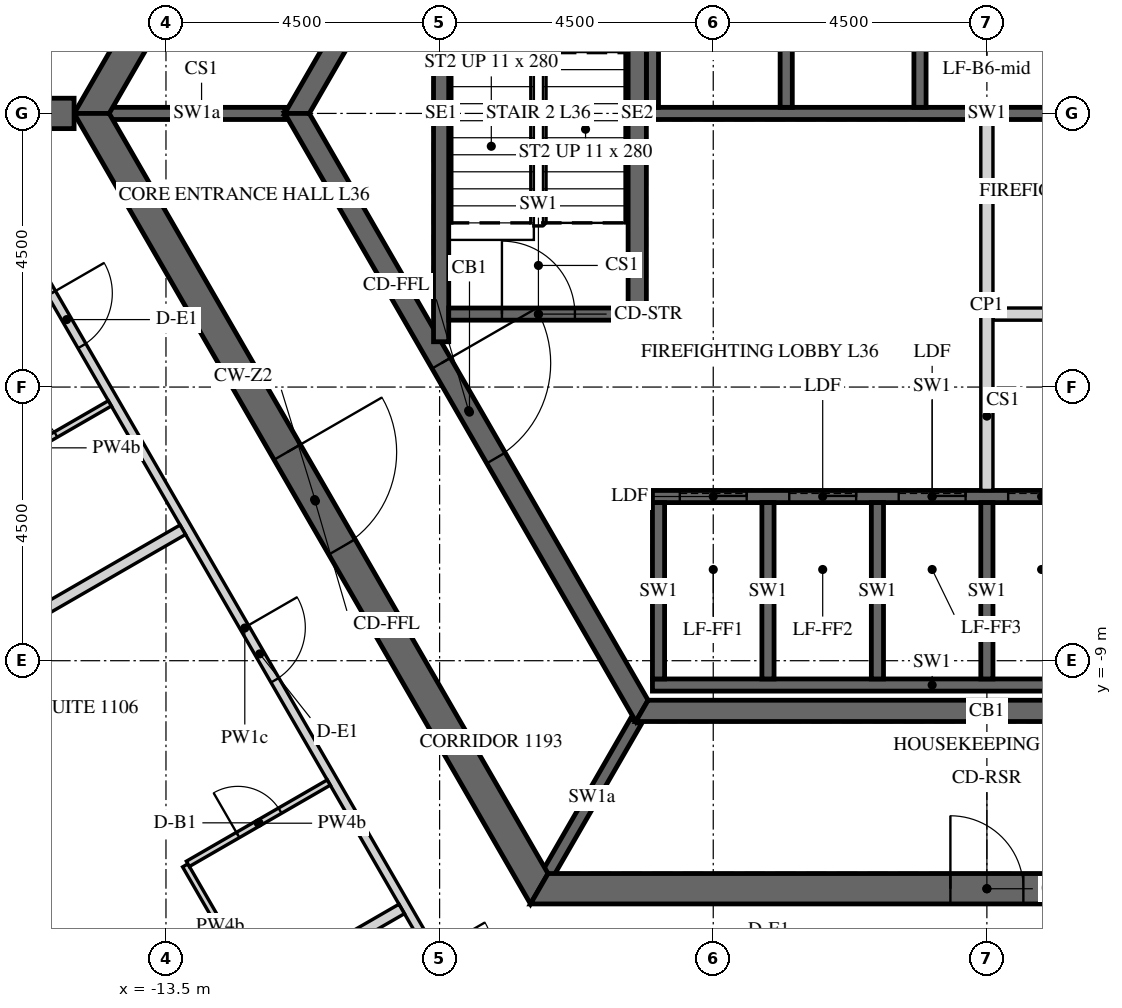
"""IFC4 building model, lengths in metres.
Left out: names, types, materials, properties, quantities, classifications, styles, units other than length and angle.
Written with IfcOpenShell. Run it as: python <this file> out.ifc"""

import sys

from ifc_helpers import new_model, si_unit, direction, frame, frame_2d, origin, place, context, subcontext, project, spatial, polyline, rectangle, outline, extrude, element, fill, save


model = new_model("IFC4")
c1 = context("Model", 3, precision=1e-05, world=origin(), true_north=direction((0.0, 1.0)))
c2 = subcontext(c1, "Body", "Model", "MODEL_VIEW")
j1 = project(units=[si_unit("LENGTHUNIT", "METRE"), si_unit("PLANEANGLEUNIT", "RADIAN")], contexts=[c1])
p1 = place(None, origin())
s1 = spatial("IfcSite", under=j1, at=p1, CompositionType="ELEMENT")
p2 = place(p1, origin())
s2 = spatial("IfcBuilding", under=s1, at=p2, CompositionType="ELEMENT")
p3 = place(p2, frame((0.0, 0.0, 156.6)))
s3 = spatial("IfcBuildingStorey", under=s2, at=p3, CompositionType="ELEMENT", Elevation=156.6)
p4 = place(p3, frame((-7.361, 12.75, -0.15), z_axis=(0.0, 0.0, 1.0), x_axis=(-0.50000571537, -0.866022103989, 0.0)))
e1 = element("IfcWall", 1, at=p4, inside=s3, PredefinedType="SHEAR", context=c2, shape_type="SweptSolid", body=[
    extrude(outline(polyline([(-0.144, -0.25), (14.867, -0.25), (14.578, 0.25), (0.144, 0.25), (-0.144, -0.25)])), origin(), (0.0, 0.0, 1.0), 3.9),
])
p5 = place(p4, frame((6.49, 0.0, 0.15)))
e2 = element("IfcOpeningElement", 2, at=p5, cuts=e1, PredefinedType="OPENING", context=c2, shape_type="SweptSolid", body=[
    extrude(rectangle(XDim=1.8, YDim=2.4, at=frame_2d((0.9, 1.2))), frame((0.0, 0.26, 0.0), z_axis=(0.0, -1.0, 0.0), x_axis=(1.0, 0.0, 0.0)), (0.0, 0.0, 1.0), 0.52),
])
p6 = place(p3, frame((-14.722, 0.0, -0.15), z_axis=(0.0, 0.0, 1.0), x_axis=(0.50000571537, -0.866022103989, 0.0)))
e3 = element("IfcWall", 3, at=p6, inside=s3, PredefinedType="SHEAR", context=c2, shape_type="SweptSolid", body=[
    extrude(outline(polyline([(-0.144, -0.25), (14.867, -0.25), (14.578, 0.25), (0.144, 0.25), (-0.144, -0.25)])), origin(), (0.0, 0.0, 1.0), 3.9),
])
p7 = place(p6, frame((6.432, 0.0, 0.15)))
e4 = element("IfcOpeningElement", 4, at=p7, cuts=e3, PredefinedType="OPENING", context=c2, shape_type="SweptSolid", body=[
    extrude(rectangle(XDim=1.8, YDim=2.4, at=frame_2d((0.9, 1.2))), frame((0.0, 0.26, 0.0), z_axis=(0.0, -1.0, 0.0), x_axis=(1.0, 0.0, 0.0)), (0.0, 0.0, 1.0), 0.52),
])
p8 = place(p3, frame((-7.361, -12.75, -0.15), z_axis=(0.0, 0.0, 1.0), x_axis=(1.0, 0.0, 0.0)))
e5 = element("IfcWall", 5, at=p8, inside=s3, PredefinedType="SHEAR", context=c2, shape_type="SweptSolid", body=[
    extrude(outline(polyline([(-0.144, -0.25), (14.866, -0.25), (14.578, 0.25), (0.144, 0.25), (-0.144, -0.25)])), origin(), (0.0, 0.0, 1.0), 3.9),
])
p9 = place(p8, frame((6.761, 0.0, 0.15)))
e6 = element("IfcOpeningElement", 6, at=p9, cuts=e5, PredefinedType="OPENING", context=c2, shape_type="SweptSolid", body=[
    extrude(rectangle(XDim=1.2, YDim=2.4, at=frame_2d((0.6, 1.2))), frame((0.0, 0.26, 0.0), z_axis=(0.0, -1.0, 0.0), x_axis=(1.0, 0.0, 0.0)), (0.0, 0.0, 1.0), 0.52),
])
p10 = place(p3, frame((-15.011, 0.0, -0.15), z_axis=(0.0, 0.0, 1.0), x_axis=(-1.0, 0.0, 0.0)))
e7 = element("IfcWall", 7, at=p10, inside=s3, PredefinedType="SHEAR", context=c2, shape_type="SweptSolid", body=[
    extrude(rectangle(XDim=15.424, YDim=0.5, at=frame_2d((7.712, 0.0))), origin(), (0.0, 0.0, 1.0), 3.9),
])
p11 = place(p10, frame((6.812, 0.0, 0.15)))
e8 = element("IfcOpeningElement", 8, at=p11, cuts=e7, PredefinedType="OPENING", context=c2, shape_type="SweptSolid", body=[
    extrude(rectangle(XDim=1.8, YDim=2.4, at=frame_2d((0.9, 1.2))), frame((0.0, 0.26, 0.0), z_axis=(0.0, -1.0, 0.0), x_axis=(1.0, 0.0, 0.0)), (0.0, 0.0, 1.0), 0.52),
])
p12 = place(p3, frame((-5.673, 9.825, -0.15), z_axis=(0.0, 0.0, 1.0), x_axis=(-0.499995046907, -0.866028263435, 0.0)))
e9 = element("IfcWall", 9, at=p12, inside=s3, PredefinedType="SHEAR", context=c2, shape_type="SweptSolid", body=[
    extrude(outline(polyline([(-0.101, -0.175), (11.446, -0.175), (11.244, 0.175), (0.101, 0.175), (-0.101, -0.175)])), origin(), (0.0, 0.0, 1.0), 3.9),
])
p13 = place(p12, frame((4.801, 0.0, 0.15)))
e10 = element("IfcOpeningElement", 10, at=p13, cuts=e9, PredefinedType="OPENING", context=c2, shape_type="SweptSolid", body=[
    extrude(rectangle(XDim=1.8, YDim=2.4, at=frame_2d((0.9, 1.2))), frame((0.0, 0.185, 0.0), z_axis=(0.0, -1.0, 0.0), x_axis=(1.0, 0.0, 0.0)), (0.0, 0.0, 1.0), 0.37),
])
p14 = place(p3, frame((-11.345, 0.0, -0.15), z_axis=(0.0, 0.0, 1.0), x_axis=(0.499995046907, -0.866028263435, 0.0)))
e11 = element("IfcWall", 11, at=p14, inside=s3, PredefinedType="SHEAR", context=c2, shape_type="SweptSolid", body=[
    extrude(outline(polyline([(-0.101, -0.175), (11.446, -0.175), (11.244, 0.175), (0.101, 0.175), (-0.101, -0.175)])), origin(), (0.0, 0.0, 1.0), 3.9),
])
p15 = place(p14, frame((4.744, 0.0, 0.15)))
e12 = element("IfcOpeningElement", 12, at=p15, cuts=e11, PredefinedType="OPENING", context=c2, shape_type="SweptSolid", body=[
    extrude(rectangle(XDim=1.8, YDim=2.4, at=frame_2d((0.9, 1.2))), frame((0.0, 0.185, 0.0), z_axis=(0.0, -1.0, 0.0), x_axis=(1.0, 0.0, 0.0)), (0.0, 0.0, 1.0), 0.37),
])
p16 = place(p3, frame((-5.673, -9.825, -0.15), z_axis=(0.0, 0.0, 1.0), x_axis=(1.0, 0.0, 0.0)))
e13 = element("IfcWall", 13, at=p16, inside=s3, PredefinedType="SHEAR", context=c2, shape_type="SweptSolid", body=[
    extrude(outline(polyline([(-0.101, -0.175), (11.446, -0.175), (11.244, 0.175), (0.101, 0.175), (-0.101, -0.175)])), origin(), (0.0, 0.0, 1.0), 3.9),
])
p17 = place(p3, frame((-5.6, 0.0, -0.25), z_axis=(0.0, 0.0, 1.0), x_axis=(1.0, 0.0, 0.0)))
e14 = element("IfcWall", 14, at=p17, inside=s3, PredefinedType="SHEAR", context=c2, shape_type="SweptSolid", body=[
    extrude(rectangle(XDim=11.2, YDim=0.2, at=frame_2d((5.6, 0.0))), origin(), (0.0, 0.0, 1.0), 3.9),
])
for number, where, z_axis, x_axis in (
    (15, (-5.5, 0.1, -0.25), (0.0, 0.0, 1.0), (0.0, 1.0, 0.0)),
    (16, (-3.3, 0.1, -0.25), (0.0, 0.0, 1.0), (0.0, 1.0, 0.0)),
    (17, (-1.1, 0.1, -0.25), (0.0, 0.0, 1.0), (0.0, 1.0, 0.0)),
):
    element("IfcWall", number, at=place(p3, frame(where, z_axis=z_axis, x_axis=x_axis)), inside=s3, PredefinedType="SHEAR", context=c2, shape_type="SweptSolid", body=[
        extrude(rectangle(XDim=3.1, YDim=0.2, at=frame_2d((1.55, 0.0))), origin(), (0.0, 0.0, 1.0), 3.9),
    ])
p18 = place(p3, frame((-5.5, -6.3, -0.25), z_axis=(0.0, 0.0, 1.0), x_axis=(1.0, 0.0, 0.0)))
e18 = element("IfcWall", 18, at=p18, inside=s3, PredefinedType="SHEAR", context=c2, shape_type="SweptSolid", body=[
    extrude(rectangle(XDim=9.2, YDim=0.2, at=frame_2d((4.6, 0.0))), origin(), (0.0, 0.0, 1.0), 3.9),
])
p19 = place(p18, frame((0.45, 0.0, 0.25)))
e19 = element("IfcOpeningElement", 19, at=p19, cuts=e18, PredefinedType="OPENING", context=c2, shape_type="SweptSolid", body=[
    extrude(rectangle(XDim=1.1, YDim=2.1, at=frame_2d((0.55, 1.05))), frame((0.0, 0.11, 0.0), z_axis=(0.0, -1.0, 0.0), x_axis=(1.0, 0.0, 0.0)), (0.0, 0.0, 1.0), 0.22),
])
p20 = place(p18, frame((2.25, 0.0, 0.25)))
e20 = element("IfcOpeningElement", 20, at=p20, cuts=e18, PredefinedType="OPENING", context=c2, shape_type="SweptSolid", body=[
    extrude(rectangle(XDim=1.1, YDim=2.1, at=frame_2d((0.55, 1.05))), frame((0.0, 0.11, 0.0), z_axis=(0.0, -1.0, 0.0), x_axis=(1.0, 0.0, 0.0)), (0.0, 0.0, 1.0), 0.22),
])
p21 = place(p18, frame((4.05, 0.0, 0.25)))
e21 = element("IfcOpeningElement", 21, at=p21, cuts=e18, PredefinedType="OPENING", context=c2, shape_type="SweptSolid", body=[
    extrude(rectangle(XDim=1.1, YDim=2.1, at=frame_2d((0.55, 1.05))), frame((0.0, 0.11, 0.0), z_axis=(0.0, -1.0, 0.0), x_axis=(1.0, 0.0, 0.0)), (0.0, 0.0, 1.0), 0.22),
])
p22 = place(p18, frame((5.85, 0.0, 0.25)))
e22 = element("IfcOpeningElement", 22, at=p22, cuts=e18, PredefinedType="OPENING", context=c2, shape_type="SweptSolid", body=[
    extrude(rectangle(XDim=1.1, YDim=2.1, at=frame_2d((0.55, 1.05))), frame((0.0, 0.11, 0.0), z_axis=(0.0, -1.0, 0.0), x_axis=(1.0, 0.0, 0.0)), (0.0, 0.0, 1.0), 0.22),
])
p23 = place(p18, frame((7.65, 0.0, 0.25)))
e23 = element("IfcOpeningElement", 23, at=p23, cuts=e18, PredefinedType="OPENING", context=c2, shape_type="SweptSolid", body=[
    extrude(rectangle(XDim=1.1, YDim=2.1, at=frame_2d((0.55, 1.05))), frame((0.0, 0.11, 0.0), z_axis=(0.0, -1.0, 0.0), x_axis=(1.0, 0.0, 0.0)), (0.0, 0.0, 1.0), 0.22),
])
p24 = place(p3, frame((-5.5, -9.4, -0.25), z_axis=(0.0, 0.0, 1.0), x_axis=(1.0, 0.0, 0.0)))
e24 = element("IfcWall", 24, at=p24, inside=s3, PredefinedType="SHEAR", context=c2, shape_type="SweptSolid", body=[
    extrude(rectangle(XDim=9.2, YDim=0.2, at=frame_2d((4.6, 0.0))), origin(), (0.0, 0.0, 1.0), 3.9),
])
for number, where, z_axis, x_axis in (
    (25, (-5.4, -9.3, -0.25), (0.0, 0.0, 1.0), (0.0, 1.0, 0.0)),
    (26, (-3.6, -9.3, -0.25), (0.0, 0.0, 1.0), (0.0, 1.0, 0.0)),
    (27, (-1.8, -9.3, -0.25), (0.0, 0.0, 1.0), (0.0, 1.0, 0.0)),
    (28, (0.0, -9.3, -0.25), (0.0, 0.0, 1.0), (0.0, 1.0, 0.0)),
):
    element("IfcWall", number, at=place(p3, frame(where, z_axis=z_axis, x_axis=x_axis)), inside=s3, PredefinedType="SHEAR", context=c2, shape_type="SweptSolid", body=[
        extrude(rectangle(XDim=2.9, YDim=0.2, at=frame_2d((1.45, 0.0))), origin(), (0.0, 0.0, 1.0), 3.9),
    ])
p25 = place(p3, frame((0.1, -3.3, 0.0), z_axis=(0.0, 0.0, 1.0), x_axis=(1.0, 0.0, 0.0)))
e29 = element("IfcWall", 29, at=p25, inside=s3, PredefinedType="PARTITIONING", context=c2, shape_type="SweptSolid", body=[
    extrude(rectangle(XDim=5.5, YDim=0.2, at=frame_2d((2.75, 0.0))), origin(), (0.0, 0.0, 1.0), 3.65),
])
p26 = place(p25, frame((2.3, 0.0, 0.0)))
e30 = element("IfcOpeningElement", 30, at=p26, cuts=e29, PredefinedType="OPENING", context=c2, shape_type="SweptSolid", body=[
    extrude(rectangle(XDim=0.9, YDim=2.1, at=frame_2d((0.45, 1.05))), frame((0.0, 0.11, 0.0), z_axis=(0.0, -1.0, 0.0), x_axis=(1.0, 0.0, 0.0)), (0.0, 0.0, 1.0), 0.22),
])
p27 = place(p3, frame((0.0, -6.2, 0.0), z_axis=(0.0, 0.0, 1.0), x_axis=(0.0, 1.0, 0.0)))
e31 = element("IfcWall", 31, at=p27, inside=s3, PredefinedType="PARTITIONING", context=c2, shape_type="SweptSolid", body=[
    extrude(rectangle(XDim=6.1, YDim=0.2, at=frame_2d((3.05, 0.0))), origin(), (0.0, 0.0, 1.0), 3.65),
])
for number, where, z_axis, x_axis in (
    (32, (-11.547, 0.0, -0.15), (0.0, 0.0, 1.0), (-1.0, 0.0, 0.0)),
    (33, (-5.773, -10.0, -0.15), (0.0, 0.0, 1.0), (-0.5, -0.866, 0.0)),
):
    element("IfcWall", number, at=place(p3, frame(where, z_axis=z_axis, x_axis=x_axis)), inside=s3, PredefinedType="SHEAR", context=c2, shape_type="SweptSolid", body=[
        extrude(rectangle(XDim=2.887, YDim=0.2, at=frame_2d((1.443, 0.0))), origin(), (0.0, 0.0, 1.0), 3.9),
    ])
p28 = place(p3, frame((-5.75, -3.4, -0.25), z_axis=(0.0, 0.0, 1.0), x_axis=(0.0, 1.0, 0.0)))
e34 = element("IfcWall", 34, at=p28, inside=s3, PredefinedType="SHEAR", context=c2, shape_type="SweptSolid", body=[
    extrude(rectangle(XDim=6.8, YDim=0.3, at=frame_2d((3.4, 0.0))), origin(), (0.0, 0.0, 1.0), 3.9),
])
p29 = place(p3, frame((-8.975, -3.755, -0.25), z_axis=(0.0, 0.0, 1.0), x_axis=(0.0, 1.0, 0.0)))
e35 = element("IfcWall", 35, at=p29, inside=s3, PredefinedType="SHEAR", context=c2, shape_type="SweptSolid", body=[
    extrude(rectangle(XDim=7.51, YDim=0.25, at=frame_2d((3.755, 0.0))), origin(), (0.0, 0.0, 1.0), 3.9),
])
p30 = place(p3, frame((-8.85, -3.3, -0.25), z_axis=(0.0, 0.0, 1.0), x_axis=(1.0, 0.0, 0.0)))
e36 = element("IfcWall", 36, at=p30, inside=s3, PredefinedType="SHEAR", context=c2, shape_type="SweptSolid", body=[
    extrude(rectangle(XDim=2.95, YDim=0.2, at=frame_2d((1.475, 0.0))), origin(), (0.0, 0.0, 1.0), 3.9),
])
p31 = place(p30, frame((0.875, 0.0, 0.25)))
e37 = element("IfcOpeningElement", 37, at=p31, cuts=e36, PredefinedType="OPENING", context=c2, shape_type="SweptSolid", body=[
    extrude(rectangle(XDim=1.2, YDim=2.4, at=frame_2d((0.6, 1.2))), frame((0.0, 0.11, 0.0), z_axis=(0.0, -1.0, 0.0), x_axis=(1.0, 0.0, 0.0)), (0.0, 0.0, 1.0), 0.22),
])
p32 = place(p3, frame((-15.863, -2.125, 0.0), z_axis=(0.0, 0.0, 1.0), x_axis=(0.500008833422, -0.866020303746, 0.0)))
e38 = element("IfcWall", 38, at=p32, inside=s3, PredefinedType="PARTITIONING", context=c2, shape_type="SweptSolid", body=[
    extrude(rectangle(XDim=14.636, YDim=0.15, at=frame_2d((7.318, 0.0))), origin(), (0.0, 0.0, 1.0), 2.823),
])
p33 = place(p32, frame((0.961, 0.0, 0.0)))
e39 = element("IfcOpeningElement", 39, at=p33, cuts=e38, PredefinedType="OPENING", context=c2, shape_type="SweptSolid", body=[
    extrude(rectangle(XDim=1.0, YDim=2.1, at=frame_2d((0.5, 1.05))), frame((0.0, 0.085, 0.0), z_axis=(0.0, -1.0, 0.0), x_axis=(1.0, 0.0, 0.0)), (0.0, 0.0, 1.0), 0.17),
])
p34 = place(p32, frame((7.309, 0.0, 0.0)))
e40 = element("IfcOpeningElement", 40, at=p34, cuts=e38, PredefinedType="OPENING", context=c2, shape_type="SweptSolid", body=[
    extrude(rectangle(XDim=1.0, YDim=2.1, at=frame_2d((0.5, 1.05))), frame((0.0, 0.085, 0.0), z_axis=(0.0, -1.0, 0.0), x_axis=(1.0, 0.0, 0.0)), (0.0, 0.0, 1.0), 0.17),
])
p35 = place(p32, frame((13.486, 0.0, 0.0)))
e41 = element("IfcOpeningElement", 41, at=p35, cuts=e38, PredefinedType="OPENING", context=c2, shape_type="SweptSolid", body=[
    extrude(rectangle(XDim=1.0, YDim=2.1, at=frame_2d((0.5, 1.05))), frame((0.0, 0.085, 0.0), z_axis=(0.0, -1.0, 0.0), x_axis=(1.0, 0.0, 0.0)), (0.0, 0.0, 1.0), 0.17),
])
p36 = place(p3, frame((-16.956, -6.231, 0.0), z_axis=(0.0, 0.0, 1.0), x_axis=(0.866046596414, 0.499963291492, 0.0)))
e42 = element("IfcWall", 42, at=p36, inside=s3, PredefinedType="PARTITIONING", context=c2, shape_type="SweptSolid", body=[
    extrude(rectangle(XDim=2.925, YDim=0.1, at=frame_2d((1.462, 0.0))), origin(), (0.0, 0.0, 1.0), 2.823),
])
p37 = place(p36, frame((1.1, 0.0, 0.0)))
e43 = element("IfcOpeningElement", 43, at=p37, cuts=e42, PredefinedType="OPENING", context=c2, shape_type="SweptSolid", body=[
    extrude(rectangle(XDim=0.8, YDim=2.1, at=frame_2d((0.4, 1.05))), frame((0.0, 0.06, 0.0), z_axis=(0.0, -1.0, 0.0), x_axis=(1.0, 0.0, 0.0)), (0.0, 0.0, 1.0), 0.12),
])
p38 = place(p3, frame((-24.114, -13.134, 0.0), z_axis=(0.0, 0.0, 1.0), x_axis=(0.866024255907, 0.500001988177, 0.0)))
e44 = element("IfcWall", 44, at=p38, inside=s3, PredefinedType="PARTITIONING", context=c2, shape_type="SweptSolid", body=[
    extrude(rectangle(XDim=12.575, YDim=0.18, at=frame_2d((6.288, 0.0))), origin(), (0.0, 0.0, 1.0), 2.823),
])
p39 = place(p3, frame((-12.028, -14.367, 0.0), z_axis=(0.0, 0.0, 1.0), x_axis=(-0.500015210774, 0.866016621662, 0.0)))
e45 = element("IfcWall", 45, at=p39, inside=s3, PredefinedType="PARTITIONING", context=c2, shape_type="SweptSolid", body=[
    extrude(rectangle(XDim=2.31, YDim=0.1, at=frame_2d((1.155, 0.0))), origin(), (0.0, 0.0, 1.0), 2.823),
])
p40 = place(p3, frame((-13.14, -12.341, 0.0), z_axis=(0.0, 0.0, 1.0), x_axis=(0.86604424267, 0.499967368674, 0.0)))
e46 = element("IfcWall", 46, at=p40, inside=s3, PredefinedType="PARTITIONING", context=c2, shape_type="SweptSolid", body=[
    extrude(rectangle(XDim=2.675, YDim=0.1, at=frame_2d((1.337, 0.0))), origin(), (0.0, 0.0, 1.0), 2.823),
])
p41 = place(p40, frame((0.95, 0.0, 0.0)))
e47 = element("IfcOpeningElement", 47, at=p41, cuts=e46, PredefinedType="OPENING", context=c2, shape_type="SweptSolid", body=[
    extrude(rectangle(XDim=0.8, YDim=2.1, at=frame_2d((0.4, 1.05))), frame((0.0, 0.06, 0.0), z_axis=(0.0, -1.0, 0.0), x_axis=(1.0, 0.0, 0.0)), (0.0, 0.0, 1.0), 0.12),
])
p42 = place(p3, frame((-20.513, -19.37, 0.0), z_axis=(0.0, 0.0, 1.0), x_axis=(0.866019402111, 0.500010395058, 0.0)))
e48 = element("IfcWall", 48, at=p42, inside=s3, PredefinedType="PARTITIONING", context=c2, shape_type="SweptSolid", body=[
    extrude(rectangle(XDim=12.575, YDim=0.18, at=frame_2d((6.288, 0.0))), origin(), (0.0, 0.0, 1.0), 2.823),
])
p43 = place(p7, origin())
e49 = element("IfcDoor", 49, at=p43, inside=s3, OperationType="DOUBLE_DOOR_SINGLE_SWING", PredefinedType="DOOR", context=c2, shape_type="SweptSolid", body=[
    extrude(rectangle(XDim=1.8, YDim=2.4, at=frame_2d((0.9, 1.2))), frame((0.0, 0.025, 0.0), z_axis=(0.0, -1.0, 0.0), x_axis=(1.0, 0.0, 0.0)), (0.0, 0.0, 1.0), 0.05),
])
fill(e4, e49)
p44 = place(p9, origin())
e50 = element("IfcDoor", 50, at=p44, inside=s3, OperationType="SINGLE_SWING_LEFT", PredefinedType="DOOR", context=c2, shape_type="SweptSolid", body=[
    extrude(rectangle(XDim=1.2, YDim=2.4, at=frame_2d((0.6, 1.2))), frame((0.0, 0.025, 0.0), z_axis=(0.0, -1.0, 0.0), x_axis=(1.0, 0.0, 0.0)), (0.0, 0.0, 1.0), 0.05),
])
fill(e6, e50)
p45 = place(p15, origin())
e51 = element("IfcDoor", 51, at=p45, inside=s3, OperationType="DOUBLE_DOOR_SINGLE_SWING", PredefinedType="DOOR", context=c2, shape_type="SweptSolid", body=[
    extrude(rectangle(XDim=1.8, YDim=2.4, at=frame_2d((0.9, 1.2))), frame((0.0, 0.025, 0.0), z_axis=(0.0, -1.0, 0.0), x_axis=(1.0, 0.0, 0.0)), (0.0, 0.0, 1.0), 0.05),
])
fill(e12, e51)
p46 = place(p31, origin())
e52 = element("IfcDoor", 52, at=p46, inside=s3, OperationType="SINGLE_SWING_LEFT", PredefinedType="DOOR", context=c2, shape_type="SweptSolid", body=[
    extrude(rectangle(XDim=1.2, YDim=2.4, at=frame_2d((0.6, 1.2))), frame((0.0, 0.025, 0.0), z_axis=(0.0, -1.0, 0.0), x_axis=(1.0, 0.0, 0.0)), (0.0, 0.0, 1.0), 0.05),
])
fill(e37, e52)
p47 = place(p19, origin())
e53 = element("IfcDoor", 53, at=p47, inside=s3, OperationType="SLIDING_TO_LEFT", PredefinedType="DOOR", context=c2, shape_type="SweptSolid", body=[
    extrude(rectangle(XDim=1.1, YDim=2.1, at=frame_2d((0.55, 1.05))), frame((0.0, 0.025, 0.0), z_axis=(0.0, -1.0, 0.0), x_axis=(1.0, 0.0, 0.0)), (0.0, 0.0, 1.0), 0.05),
])
fill(e19, e53)
p48 = place(p20, origin())
e54 = element("IfcDoor", 54, at=p48, inside=s3, OperationType="SLIDING_TO_LEFT", PredefinedType="DOOR", context=c2, shape_type="SweptSolid", body=[
    extrude(rectangle(XDim=1.1, YDim=2.1, at=frame_2d((0.55, 1.05))), frame((0.0, 0.025, 0.0), z_axis=(0.0, -1.0, 0.0), x_axis=(1.0, 0.0, 0.0)), (0.0, 0.0, 1.0), 0.05),
])
fill(e20, e54)
p49 = place(p21, origin())
e55 = element("IfcDoor", 55, at=p49, inside=s3, OperationType="SLIDING_TO_LEFT", PredefinedType="DOOR", context=c2, shape_type="SweptSolid", body=[
    extrude(rectangle(XDim=1.1, YDim=2.1, at=frame_2d((0.55, 1.05))), frame((0.0, 0.025, 0.0), z_axis=(0.0, -1.0, 0.0), x_axis=(1.0, 0.0, 0.0)), (0.0, 0.0, 1.0), 0.05),
])
fill(e21, e55)
p50 = place(p22, origin())
e56 = element("IfcDoor", 56, at=p50, inside=s3, OperationType="SLIDING_TO_LEFT", PredefinedType="DOOR", context=c2, shape_type="SweptSolid", body=[
    extrude(rectangle(XDim=1.1, YDim=2.1, at=frame_2d((0.55, 1.05))), frame((0.0, 0.025, 0.0), z_axis=(0.0, -1.0, 0.0), x_axis=(1.0, 0.0, 0.0)), (0.0, 0.0, 1.0), 0.05),
])
fill(e22, e56)
p51 = place(p33, origin())
e57 = element("IfcDoor", 57, at=p51, inside=s3, OperationType="SINGLE_SWING_RIGHT", PredefinedType="DOOR", context=c2, shape_type="SweptSolid", body=[
    extrude(rectangle(XDim=1.0, YDim=2.1, at=frame_2d((0.5, 1.05))), frame((0.0, 0.025, 0.0), z_axis=(0.0, -1.0, 0.0), x_axis=(1.0, 0.0, 0.0)), (0.0, 0.0, 1.0), 0.05),
])
fill(e39, e57)
p52 = place(p37, origin())
e58 = element("IfcDoor", 58, at=p52, inside=s3, OperationType="SINGLE_SWING_LEFT", PredefinedType="DOOR", context=c2, shape_type="SweptSolid", body=[
    extrude(rectangle(XDim=0.8, YDim=2.1, at=frame_2d((0.4, 1.05))), frame((0.0, 0.025, 0.0), z_axis=(0.0, -1.0, 0.0), x_axis=(1.0, 0.0, 0.0)), (0.0, 0.0, 1.0), 0.05),
])
fill(e43, e58)
p53 = place(p34, origin())
e59 = element("IfcDoor", 59, at=p53, inside=s3, OperationType="SINGLE_SWING_LEFT", PredefinedType="DOOR", context=c2, shape_type="SweptSolid", body=[
    extrude(rectangle(XDim=1.0, YDim=2.1, at=frame_2d((0.5, 1.05))), frame((0.0, 0.025, 0.0), z_axis=(0.0, -1.0, 0.0), x_axis=(1.0, 0.0, 0.0)), (0.0, 0.0, 1.0), 0.05),
])
fill(e40, e59)
p54 = place(p41, origin())
e60 = element("IfcDoor", 60, at=p54, inside=s3, OperationType="SINGLE_SWING_RIGHT", PredefinedType="DOOR", context=c2, shape_type="SweptSolid", body=[
    extrude(rectangle(XDim=0.8, YDim=2.1, at=frame_2d((0.4, 1.05))), frame((0.0, 0.025, 0.0), z_axis=(0.0, -1.0, 0.0), x_axis=(1.0, 0.0, 0.0)), (0.0, 0.0, 1.0), 0.05),
])
fill(e47, e60)
save(model, sys.argv[1])
